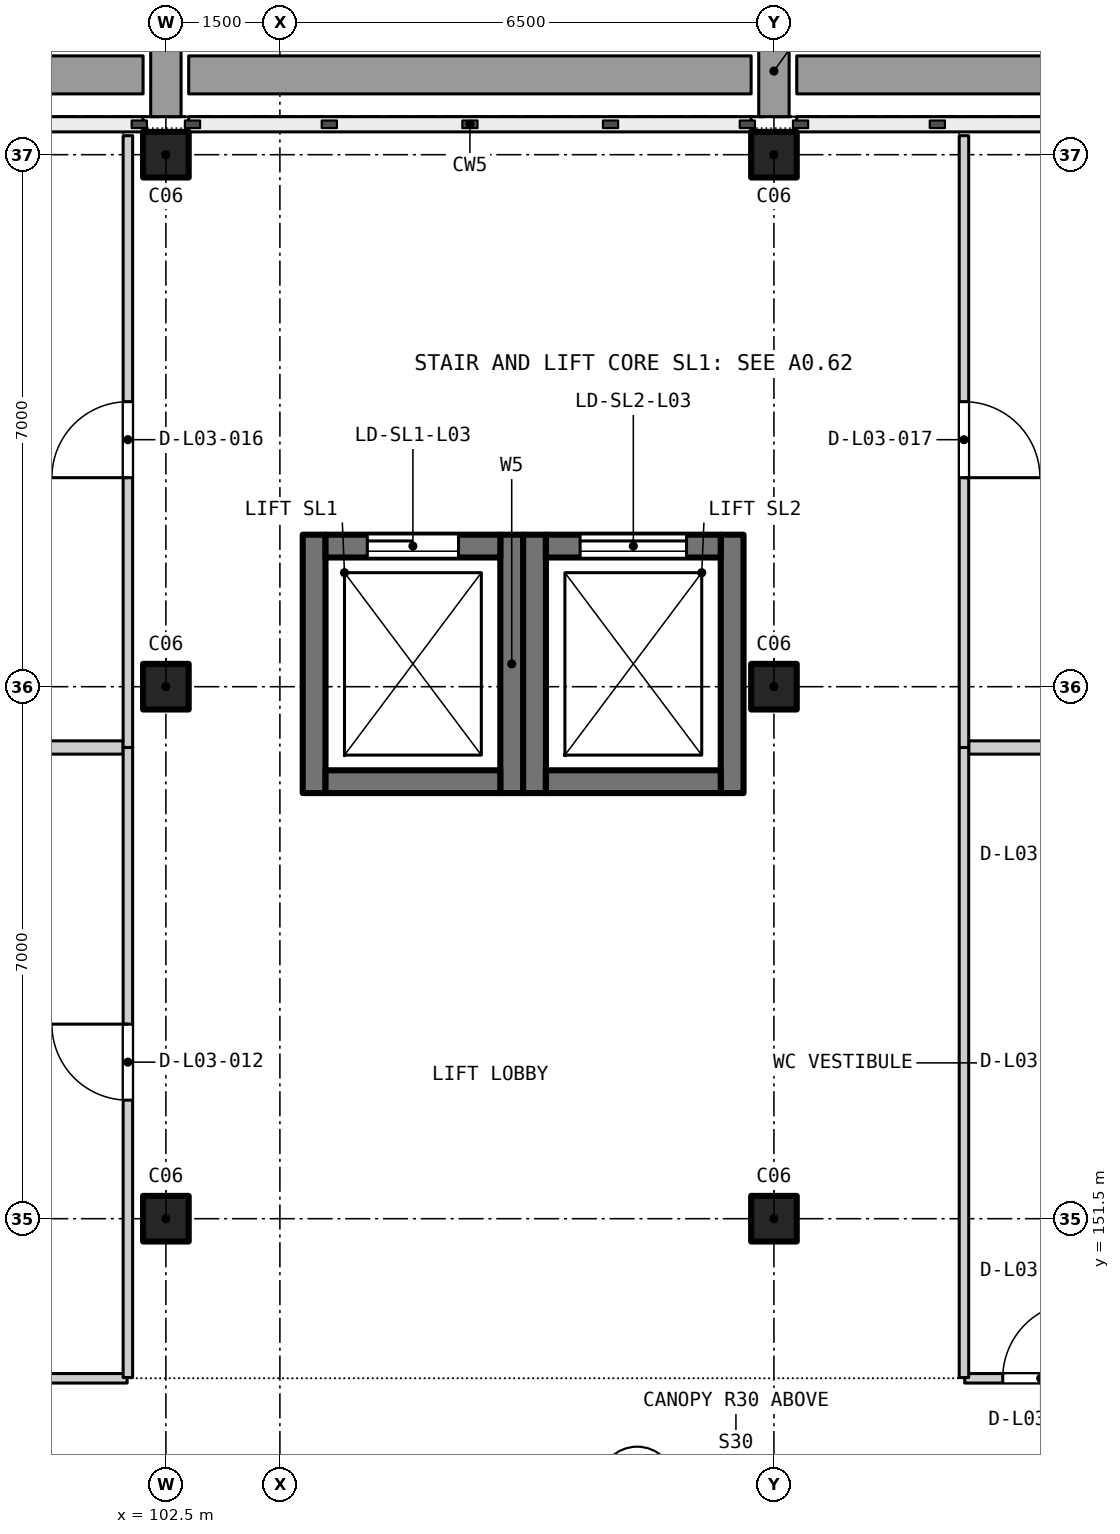
"""IFC4 building model, lengths in metres.
Left out: names, types, materials, properties, quantities, classifications, styles, units other than length and angle.
Written with IfcOpenShell. Run it as: python <this file> out.ifc"""

import sys

from ifc_helpers import new_model, si_unit, direction, frame, frame_2d, origin, origin_2d, place, context, subcontext, project, spatial, rectangle, extrude, element, fill, save


model = new_model("IFC4")
c1 = context("Model", 3, precision=1e-05, world=origin(), true_north=direction((0.0, 1.0)))
c2 = subcontext(c1, "Body", "Model", "MODEL_VIEW")
j1 = project(units=[si_unit("LENGTHUNIT", "METRE"), si_unit("PLANEANGLEUNIT", "RADIAN")], contexts=[c1])
p1 = place(None, origin())
s1 = spatial("IfcSite", under=j1, at=p1, CompositionType="ELEMENT")
p2 = place(p1, origin())
s2 = spatial("IfcBuilding", under=s1, at=p2, CompositionType="ELEMENT")
p3 = place(p2, frame((0.0, 0.0, 14.4)))
s3 = spatial("IfcBuildingStorey", under=s2, at=p3, CompositionType="ELEMENT", Elevation=14.4)
for number, where, z_axis, x_axis in (
    (1, (102.5, 151.5, 0.0), (0.0, 0.0, 1.0), (1.0, 0.0, 0.0)),
    (2, (102.5, 158.5, 0.0), (0.0, 0.0, 1.0), (1.0, 0.0, 0.0)),
    (3, (102.5, 165.5, 0.0), (0.0, 0.0, 1.0), (1.0, 0.0, 0.0)),
    (4, (110.5, 151.5, 0.0), (0.0, 0.0, 1.0), (1.0, 0.0, 0.0)),
    (5, (110.5, 158.5, 0.0), (0.0, 0.0, 1.0), (1.0, 0.0, 0.0)),
    (6, (110.5, 165.5, 0.0), (0.0, 0.0, 1.0), (1.0, 0.0, 0.0)),
):
    element("IfcColumn", number, at=place(p3, frame(where, z_axis=z_axis, x_axis=x_axis)), inside=s3, PredefinedType="COLUMN", context=c2, shape_type="SweptSolid", body=[
        extrude(rectangle(XDim=0.6, YDim=0.6, at=origin_2d()), origin(), (0.0, 0.0, 1.0), 3.9),
    ])
for number, where, z_axis, x_axis in (
    (7, (104.45, 157.1, 0.0), (0.0, 0.0, 1.0), (0.0, 1.0, 0.0)),
    (8, (107.05, 157.1, 0.0), (0.0, 0.0, 1.0), (0.0, 1.0, 0.0)),
):
    element("IfcWall", number, at=place(p3, frame(where, z_axis=z_axis, x_axis=x_axis)), inside=s3, PredefinedType="SHEAR", context=c2, shape_type="SweptSolid", body=[
        extrude(rectangle(XDim=3.4, YDim=0.3, at=frame_2d((1.7, 0.0))), origin(), (0.0, 0.0, 1.0), 3.9),
    ])
p4 = place(p3, frame((104.6, 157.25, 0.0), z_axis=(0.0, 0.0, 1.0), x_axis=(1.0, 0.0, 0.0)))
e9 = element("IfcWall", 9, at=p4, inside=s3, PredefinedType="SHEAR", context=c2, shape_type="SweptSolid", body=[
    extrude(rectangle(XDim=2.3, YDim=0.3, at=frame_2d((1.15, 0.0))), origin(), (0.0, 0.0, 1.0), 3.9),
])
p5 = place(p3, frame((104.6, 160.35, 0.0), z_axis=(0.0, 0.0, 1.0), x_axis=(1.0, 0.0, 0.0)))
e10 = element("IfcWall", 10, at=p5, inside=s3, PredefinedType="SHEAR", context=c2, shape_type="SweptSolid", body=[
    extrude(rectangle(XDim=2.3, YDim=0.3, at=frame_2d((1.15, 0.0))), origin(), (0.0, 0.0, 1.0), 3.9),
])
p6 = place(p5, frame((0.55, 0.0, 0.0)))
e11 = element("IfcOpeningElement", 11, at=p6, cuts=e10, PredefinedType="OPENING", context=c2, shape_type="SweptSolid", body=[
    extrude(rectangle(XDim=1.2, YDim=2.1, at=frame_2d((0.6, 1.05))), frame((0.0, 0.16, 0.0), z_axis=(0.0, -1.0, 0.0), x_axis=(1.0, 0.0, 0.0)), (0.0, 0.0, 1.0), 0.32),
])
for number, where, z_axis, x_axis in (
    (12, (107.35, 157.1, 0.0), (0.0, 0.0, 1.0), (0.0, 1.0, 0.0)),
    (13, (109.95, 157.1, 0.0), (0.0, 0.0, 1.0), (0.0, 1.0, 0.0)),
):
    element("IfcWall", number, at=place(p3, frame(where, z_axis=z_axis, x_axis=x_axis)), inside=s3, PredefinedType="SHEAR", context=c2, shape_type="SweptSolid", body=[
        extrude(rectangle(XDim=3.4, YDim=0.3, at=frame_2d((1.7, 0.0))), origin(), (0.0, 0.0, 1.0), 3.9),
    ])
p7 = place(p3, frame((107.5, 157.25, 0.0), z_axis=(0.0, 0.0, 1.0), x_axis=(1.0, 0.0, 0.0)))
e14 = element("IfcWall", 14, at=p7, inside=s3, PredefinedType="SHEAR", context=c2, shape_type="SweptSolid", body=[
    extrude(rectangle(XDim=2.3, YDim=0.3, at=frame_2d((1.15, 0.0))), origin(), (0.0, 0.0, 1.0), 3.9),
])
p8 = place(p3, frame((107.5, 160.35, 0.0), z_axis=(0.0, 0.0, 1.0), x_axis=(1.0, 0.0, 0.0)))
e15 = element("IfcWall", 15, at=p8, inside=s3, PredefinedType="SHEAR", context=c2, shape_type="SweptSolid", body=[
    extrude(rectangle(XDim=2.3, YDim=0.3, at=frame_2d((1.15, 0.0))), origin(), (0.0, 0.0, 1.0), 3.9),
])
p9 = place(p8, frame((0.45, 0.0, 0.0)))
e16 = element("IfcOpeningElement", 16, at=p9, cuts=e15, PredefinedType="OPENING", context=c2, shape_type="SweptSolid", body=[
    extrude(rectangle(XDim=1.4, YDim=2.1, at=frame_2d((0.7, 1.05))), frame((0.0, 0.16, 0.0), z_axis=(0.0, -1.0, 0.0), x_axis=(1.0, 0.0, 0.0)), (0.0, 0.0, 1.0), 0.32),
])
p10 = place(p3, frame((86.0, 165.875, 4.2), z_axis=(0.0, 0.0, 1.0), x_axis=(1.0, 0.0, 0.0)))
e17 = element("IfcWall", 17, at=p10, inside=s3, PredefinedType="PARAPET", context=c2, shape_type="SweptSolid", body=[
    extrude(rectangle(XDim=48.0, YDim=0.25, at=frame_2d((24.0, 0.0))), origin(), (0.0, 0.0, 1.0), 1.1),
])
p11 = place(p3, frame((89.61, 149.4, 0.0), z_axis=(0.0, 0.0, 1.0), x_axis=(1.0, 0.0, 0.0)))
e18 = element("IfcWall", 18, at=p11, inside=s3, PredefinedType="PARTITIONING", context=c2, shape_type="SweptSolid", body=[
    extrude(rectangle(XDim=12.38, YDim=0.125, at=frame_2d((6.19, 0.0))), origin(), (0.0, 0.0, 1.0), 3.9),
])
p12 = place(p11, frame((5.7, 0.0, 0.0)))
e19 = element("IfcOpeningElement", 19, at=p12, cuts=e18, PredefinedType="OPENING", context=c2, shape_type="SweptSolid", body=[
    extrude(rectangle(XDim=1.0, YDim=2.1, at=frame_2d((0.5, 1.05))), frame((0.0, 0.073, 0.0), z_axis=(0.0, -1.0, 0.0), x_axis=(1.0, 0.0, 0.0)), (0.0, 0.0, 1.0), 0.145),
])
p13 = place(p3, frame((113.01, 149.4, 0.0), z_axis=(0.0, 0.0, 1.0), x_axis=(1.0, 0.0, 0.0)))
e20 = element("IfcWall", 20, at=p13, inside=s3, PredefinedType="PARTITIONING", context=c2, shape_type="SweptSolid", body=[
    extrude(rectangle(XDim=1.99, YDim=0.125, at=frame_2d((0.995, 0.0))), origin(), (0.0, 0.0, 1.0), 3.9),
])
p14 = place(p13, frame((0.5, 0.0, 0.0)))
e21 = element("IfcOpeningElement", 21, at=p14, cuts=e20, PredefinedType="OPENING", context=c2, shape_type="SweptSolid", body=[
    extrude(rectangle(XDim=1.0, YDim=2.1, at=frame_2d((0.5, 1.05))), frame((0.0, 0.073, 0.0), z_axis=(0.0, -1.0, 0.0), x_axis=(1.0, 0.0, 0.0)), (0.0, 0.0, 1.0), 0.145),
])
p15 = place(p3, frame((89.663, 157.7, 0.0), z_axis=(0.0, 0.0, 1.0), x_axis=(1.0, 0.0, 0.0)))
e22 = element("IfcWall", 22, at=p15, inside=s3, PredefinedType="PARTITIONING", context=c2, shape_type="SweptSolid", body=[
    extrude(rectangle(XDim=12.275, YDim=0.175, at=frame_2d((6.137, 0.0))), origin(), (0.0, 0.0, 1.0), 3.9),
])
p16 = place(p15, frame((0.1, 0.0, 0.0)))
e23 = element("IfcOpeningElement", 23, at=p16, cuts=e22, PredefinedType="OPENING", context=c2, shape_type="SweptSolid", body=[
    extrude(rectangle(XDim=1.0, YDim=2.1, at=frame_2d((0.5, 1.05))), frame((0.0, 0.097, 0.0), z_axis=(0.0, -1.0, 0.0), x_axis=(1.0, 0.0, 0.0)), (0.0, 0.0, 1.0), 0.195),
])
p17 = place(p3, frame((113.062, 157.7, 0.0), z_axis=(0.0, 0.0, 1.0), x_axis=(1.0, 0.0, 0.0)))
e24 = element("IfcWall", 24, at=p17, inside=s3, PredefinedType="PARTITIONING", context=c2, shape_type="SweptSolid", body=[
    extrude(rectangle(XDim=1.938, YDim=0.175, at=frame_2d((0.969, 0.0))), origin(), (0.0, 0.0, 1.0), 3.9),
])
p18 = place(p3, frame((102.0, 149.41, 0.0), z_axis=(0.0, 0.0, 1.0), x_axis=(0.0, 1.0, 0.0)))
e25 = element("IfcWall", 25, at=p18, inside=s3, PredefinedType="PARTITIONING", context=c2, shape_type="SweptSolid", body=[
    extrude(rectangle(XDim=8.29, YDim=0.125, at=frame_2d((4.145, 0.0))), origin(), (0.0, 0.0, 1.0), 3.9),
])
p19 = place(p18, frame((3.65, 0.0, 0.0)))
e26 = element("IfcOpeningElement", 26, at=p19, cuts=e25, PredefinedType="OPENING", context=c2, shape_type="SweptSolid", body=[
    extrude(rectangle(XDim=1.0, YDim=2.1, at=frame_2d((0.5, 1.05))), frame((0.0, 0.073, 0.0), z_axis=(0.0, -1.0, 0.0), x_axis=(1.0, 0.0, 0.0)), (0.0, 0.0, 1.0), 0.145),
])
p20 = place(p3, frame((102.0, 157.7, 0.0), z_axis=(0.0, 0.0, 1.0), x_axis=(0.0, 1.0, 0.0)))
e27 = element("IfcWall", 27, at=p20, inside=s3, PredefinedType="PARTITIONING", context=c2, shape_type="SweptSolid", body=[
    extrude(rectangle(XDim=8.05, YDim=0.125, at=frame_2d((4.025, 0.0))), origin(), (0.0, 0.0, 1.0), 3.9),
])
p21 = place(p20, frame((3.55, 0.0, 0.0)))
e28 = element("IfcOpeningElement", 28, at=p21, cuts=e27, PredefinedType="OPENING", context=c2, shape_type="SweptSolid", body=[
    extrude(rectangle(XDim=1.0, YDim=2.1, at=frame_2d((0.5, 1.05))), frame((0.0, 0.073, 0.0), z_axis=(0.0, -1.0, 0.0), x_axis=(1.0, 0.0, 0.0)), (0.0, 0.0, 1.0), 0.145),
])
p22 = place(p3, frame((113.0, 149.41, 0.0), z_axis=(0.0, 0.0, 1.0), x_axis=(0.0, 1.0, 0.0)))
e29 = element("IfcWall", 29, at=p22, inside=s3, PredefinedType="PARTITIONING", context=c2, shape_type="SweptSolid", body=[
    extrude(rectangle(XDim=8.29, YDim=0.125, at=frame_2d((4.145, 0.0))), origin(), (0.0, 0.0, 1.0), 3.9),
])
p23 = place(p3, frame((113.0, 157.7, 0.0), z_axis=(0.0, 0.0, 1.0), x_axis=(0.0, 1.0, 0.0)))
e30 = element("IfcWall", 30, at=p23, inside=s3, PredefinedType="PARTITIONING", context=c2, shape_type="SweptSolid", body=[
    extrude(rectangle(XDim=8.05, YDim=0.125, at=frame_2d((4.025, 0.0))), origin(), (0.0, 0.0, 1.0), 3.9),
])
p24 = place(p23, frame((3.55, 0.0, 0.0)))
e31 = element("IfcOpeningElement", 31, at=p24, cuts=e30, PredefinedType="OPENING", context=c2, shape_type="SweptSolid", body=[
    extrude(rectangle(XDim=1.0, YDim=2.1, at=frame_2d((0.5, 1.05))), frame((0.0, 0.073, 0.0), z_axis=(0.0, -1.0, 0.0), x_axis=(1.0, 0.0, 0.0)), (0.0, 0.0, 1.0), 0.145),
])
p25 = place(p14, origin())
e32 = element("IfcDoor", 32, at=p25, inside=s3, OperationType="SINGLE_SWING_RIGHT", PredefinedType="DOOR", context=c2, shape_type="SweptSolid", body=[
    extrude(rectangle(XDim=1.0, YDim=2.1, at=frame_2d((0.5, 1.05))), frame((0.0, 0.025, 0.0), z_axis=(0.0, -1.0, 0.0), x_axis=(1.0, 0.0, 0.0)), (0.0, 0.0, 1.0), 0.05),
])
fill(e21, e32)
p26 = place(p19, origin())
e33 = element("IfcDoor", 33, at=p26, inside=s3, OperationType="SINGLE_SWING_RIGHT", PredefinedType="DOOR", context=c2, shape_type="SweptSolid", body=[
    extrude(rectangle(XDim=1.0, YDim=2.1, at=frame_2d((0.5, 1.05))), frame((0.0, 0.025, 0.0), z_axis=(0.0, -1.0, 0.0), x_axis=(1.0, 0.0, 0.0)), (0.0, 0.0, 1.0), 0.05),
])
fill(e26, e33)
p27 = place(p21, origin())
e34 = element("IfcDoor", 34, at=p27, inside=s3, OperationType="SINGLE_SWING_LEFT", PredefinedType="DOOR", context=c2, shape_type="SweptSolid", body=[
    extrude(rectangle(XDim=1.0, YDim=2.1, at=frame_2d((0.5, 1.05))), frame((0.0, 0.025, 0.0), z_axis=(0.0, -1.0, 0.0), x_axis=(1.0, 0.0, 0.0)), (0.0, 0.0, 1.0), 0.05),
])
fill(e28, e34)
p28 = place(p24, frame((1.0, 0.0, 0.0), z_axis=(0.0, 0.0, 1.0), x_axis=(-1.0, 0.0, 0.0)))
e35 = element("IfcDoor", 35, at=p28, inside=s3, OperationType="SINGLE_SWING_RIGHT", PredefinedType="DOOR", context=c2, shape_type="SweptSolid", body=[
    extrude(rectangle(XDim=1.0, YDim=2.1, at=frame_2d((0.5, 1.05))), frame((0.0, 0.025, 0.0), z_axis=(0.0, -1.0, 0.0), x_axis=(1.0, 0.0, 0.0)), (0.0, 0.0, 1.0), 0.05),
])
fill(e31, e35)
p29 = place(p6, origin())
e36 = element("IfcDoor", 36, at=p29, inside=s3, OperationType="SLIDING_TO_LEFT", PredefinedType="DOOR", context=c2, shape_type="SweptSolid", body=[
    extrude(rectangle(XDim=1.2, YDim=2.1, at=frame_2d((0.6, 1.05))), frame((0.0, 0.025, 0.0), z_axis=(0.0, -1.0, 0.0), x_axis=(1.0, 0.0, 0.0)), (0.0, 0.0, 1.0), 0.05),
])
fill(e11, e36)
p30 = place(p9, origin())
e37 = element("IfcDoor", 37, at=p30, inside=s3, OperationType="DOUBLE_DOOR_SLIDING", PredefinedType="DOOR", context=c2, shape_type="SweptSolid", body=[
    extrude(rectangle(XDim=1.4, YDim=2.1, at=frame_2d((0.7, 1.05))), frame((0.0, 0.025, 0.0), z_axis=(0.0, -1.0, 0.0), x_axis=(1.0, 0.0, 0.0)), (0.0, 0.0, 1.0), 0.05),
])
fill(e16, e37)
save(model, sys.argv[1])
